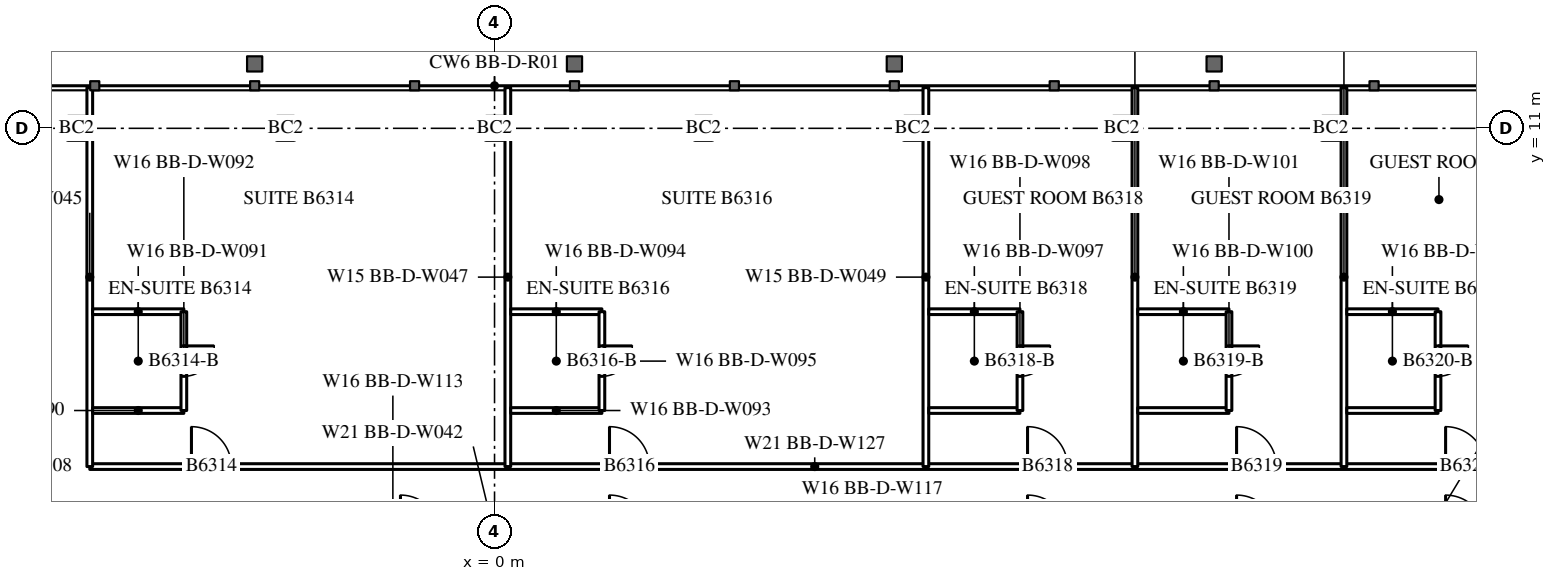
"""IFC4 building model, lengths in metres.
Left out: names, types, materials, properties, quantities, classifications, styles, units other than length and angle.
Written with IfcOpenShell. Run it as: python <this file> out.ifc"""

import sys

from ifc_helpers import new_model, si_unit, direction, frame, frame_2d, origin, origin_2d, place, context, subcontext, project, spatial, rectangle, i_section, extrude, element, fill, save


model = new_model("IFC4")
c1 = context("Model", 3, precision=1e-05, world=origin(), true_north=direction((0.0, 1.0)))
c2 = subcontext(c1, "Body", "Model", "MODEL_VIEW")
j1 = project(units=[si_unit("LENGTHUNIT", "METRE"), si_unit("PLANEANGLEUNIT", "RADIAN")], contexts=[c1])
p1 = place(None, origin())
s1 = spatial("IfcSite", under=j1, at=p1, CompositionType="ELEMENT")
p2 = place(p1, origin())
s2 = spatial("IfcBuilding", under=s1, at=p2, CompositionType="ELEMENT")
p3 = place(p2, frame((0.0, 0.0, 236.9)))
s3 = spatial("IfcBuildingStorey", under=s2, at=p3, CompositionType="ELEMENT", Elevation=236.9)
for number, where, z_axis, x_axis in (
    (1, (-11.0, 11.0, 0.0), (0.0, 0.0, 1.0), (1.0, 0.0, 0.0)),
    (2, (-5.5, 11.0, 0.0), (0.0, 0.0, 1.0), (1.0, 0.0, 0.0)),
    (3, (0.0, 11.0, 0.0), (0.0, 0.0, 1.0), (1.0, 0.0, 0.0)),
    (4, (5.5, 11.0, 0.0), (0.0, 0.0, 1.0), (1.0, 0.0, 0.0)),
    (5, (11.0, 11.0, 0.0), (0.0, 0.0, 1.0), (1.0, 0.0, 0.0)),
    (6, (16.5, 11.0, 0.0), (0.0, 0.0, 1.0), (1.0, 0.0, 0.0)),
    (7, (22.0, 11.0, 0.0), (0.0, 0.0, 1.0), (1.0, 0.0, 0.0)),
):
    element("IfcColumn", number, at=place(p3, frame(where, z_axis=z_axis, x_axis=x_axis)), inside=s3, PredefinedType="COLUMN", context=c2, shape_type="SweptSolid", body=[
        extrude(i_section(OverallWidth=0.448, OverallDepth=0.55, WebThickness=0.072, FlangeThickness=0.115, FilletRadius=0.02, at=origin_2d()), origin(), (0.0, 0.0, 1.0), 3.6),
    ])
p4 = place(p3, frame((-10.65, 2.1, 0.0), z_axis=(0.0, 0.0, 1.0), x_axis=(1.0, 0.0, 0.0)))
e8 = element("IfcWall", 8, at=p4, inside=s3, PredefinedType="PARTITIONING", context=c2, shape_type="SweptSolid", body=[
    extrude(rectangle(XDim=38.15, YDim=0.15, at=frame_2d((19.075, 0.0))), origin(), (0.0, 0.0, 1.0), 3.4),
])
p5 = place(p4, frame((2.675, 0.0, 0.0)))
e9 = element("IfcOpeningElement", 9, at=p5, cuts=e8, PredefinedType="OPENING", context=c2, shape_type="SweptSolid", body=[
    extrude(rectangle(XDim=1.05, YDim=2.4, at=frame_2d((0.525, 1.2))), frame((0.0, 0.085, 0.0), z_axis=(0.0, -1.0, 0.0), x_axis=(1.0, 0.0, 0.0)), (0.0, 0.0, 1.0), 0.17),
])
p6 = place(p4, frame((13.675, 0.0, 0.0)))
e10 = element("IfcOpeningElement", 10, at=p6, cuts=e8, PredefinedType="OPENING", context=c2, shape_type="SweptSolid", body=[
    extrude(rectangle(XDim=1.05, YDim=2.4, at=frame_2d((0.525, 1.2))), frame((0.0, 0.085, 0.0), z_axis=(0.0, -1.0, 0.0), x_axis=(1.0, 0.0, 0.0)), (0.0, 0.0, 1.0), 0.17),
])
p7 = place(p4, frame((24.675, 0.0, 0.0)))
e11 = element("IfcOpeningElement", 11, at=p7, cuts=e8, PredefinedType="OPENING", context=c2, shape_type="SweptSolid", body=[
    extrude(rectangle(XDim=1.05, YDim=2.4, at=frame_2d((0.525, 1.2))), frame((0.0, 0.085, 0.0), z_axis=(0.0, -1.0, 0.0), x_axis=(1.0, 0.0, 0.0)), (0.0, 0.0, 1.0), 0.17),
])
p8 = place(p4, frame((30.175, 0.0, 0.0)))
e12 = element("IfcOpeningElement", 12, at=p8, cuts=e8, PredefinedType="OPENING", context=c2, shape_type="SweptSolid", body=[
    extrude(rectangle(XDim=1.05, YDim=2.4, at=frame_2d((0.525, 1.2))), frame((0.0, 0.085, 0.0), z_axis=(0.0, -1.0, 0.0), x_axis=(1.0, 0.0, 0.0)), (0.0, 0.0, 1.0), 0.17),
])
p9 = place(p4, frame((35.675, 0.0, 0.0)))
e13 = element("IfcOpeningElement", 13, at=p9, cuts=e8, PredefinedType="OPENING", context=c2, shape_type="SweptSolid", body=[
    extrude(rectangle(XDim=1.05, YDim=2.4, at=frame_2d((0.525, 1.2))), frame((0.0, 0.085, 0.0), z_axis=(0.0, -1.0, 0.0), x_axis=(1.0, 0.0, 0.0)), (0.0, 0.0, 1.0), 0.17),
])
for number, where, z_axis, x_axis in (
    (14, (-10.65, 2.1, 0.0), (0.0, 0.0, 1.0), (0.0, 1.0, 0.0)),
    (15, (0.35, 2.1, 0.0), (0.0, 0.0, 1.0), (0.0, 1.0, 0.0)),
    (16, (11.35, 2.1, 0.0), (0.0, 0.0, 1.0), (0.0, 1.0, 0.0)),
    (17, (16.85, 2.1, 0.0), (0.0, 0.0, 1.0), (0.0, 1.0, 0.0)),
    (18, (22.35, 2.1, 0.0), (0.0, 0.0, 1.0), (0.0, 1.0, 0.0)),
):
    element("IfcWall", number, at=place(p3, frame(where, z_axis=z_axis, x_axis=x_axis)), inside=s3, PredefinedType="PARTITIONING", context=c2, shape_type="SweptSolid", body=[
        extrude(rectangle(XDim=9.97, YDim=0.15, at=frame_2d((4.985, 0.0))), origin(), (0.0, 0.0, 1.0), 3.4),
    ])
for number, where, z_axis, x_axis in (
    (19, (-10.575, 6.175, 0.0), (0.0, 0.0, 1.0), (1.0, 0.0, 0.0)),
    (20, (-10.575, 3.575, 0.0), (0.0, 0.0, 1.0), (1.0, 0.0, 0.0)),
):
    element("IfcWall", number, at=place(p3, frame(where, z_axis=z_axis, x_axis=x_axis)), inside=s3, PredefinedType="PARTITIONING", context=c2, shape_type="SweptSolid", body=[
        extrude(rectangle(XDim=2.4, YDim=0.15, at=frame_2d((1.2, 0.0))), origin(), (0.0, 0.0, 1.0), 3.4),
    ])
p10 = place(p3, frame((-8.175, 3.575, 0.0), z_axis=(0.0, 0.0, 1.0), x_axis=(0.0, 1.0, 0.0)))
e21 = element("IfcWall", 21, at=p10, inside=s3, PredefinedType="PARTITIONING", context=c2, shape_type="SweptSolid", body=[
    extrude(rectangle(XDim=2.6, YDim=0.15, at=frame_2d((1.3, 0.0))), origin(), (0.0, 0.0, 1.0), 3.4),
])
p11 = place(p10, frame((0.9, 0.0, 0.0)))
e22 = element("IfcOpeningElement", 22, at=p11, cuts=e21, PredefinedType="OPENING", context=c2, shape_type="SweptSolid", body=[
    extrude(rectangle(XDim=0.8, YDim=2.2, at=frame_2d((0.4, 1.1))), frame((0.0, 0.085, 0.0), z_axis=(0.0, -1.0, 0.0), x_axis=(1.0, 0.0, 0.0)), (0.0, 0.0, 1.0), 0.17),
])
for number, where, z_axis, x_axis in (
    (23, (0.425, 6.175, 0.0), (0.0, 0.0, 1.0), (1.0, 0.0, 0.0)),
    (24, (0.425, 3.575, 0.0), (0.0, 0.0, 1.0), (1.0, 0.0, 0.0)),
):
    element("IfcWall", number, at=place(p3, frame(where, z_axis=z_axis, x_axis=x_axis)), inside=s3, PredefinedType="PARTITIONING", context=c2, shape_type="SweptSolid", body=[
        extrude(rectangle(XDim=2.4, YDim=0.15, at=frame_2d((1.2, 0.0))), origin(), (0.0, 0.0, 1.0), 3.4),
    ])
p12 = place(p3, frame((2.825, 3.575, 0.0), z_axis=(0.0, 0.0, 1.0), x_axis=(0.0, 1.0, 0.0)))
e25 = element("IfcWall", 25, at=p12, inside=s3, PredefinedType="PARTITIONING", context=c2, shape_type="SweptSolid", body=[
    extrude(rectangle(XDim=2.6, YDim=0.15, at=frame_2d((1.3, 0.0))), origin(), (0.0, 0.0, 1.0), 3.4),
])
p13 = place(p12, frame((0.9, 0.0, 0.0)))
e26 = element("IfcOpeningElement", 26, at=p13, cuts=e25, PredefinedType="OPENING", context=c2, shape_type="SweptSolid", body=[
    extrude(rectangle(XDim=0.8, YDim=2.2, at=frame_2d((0.4, 1.1))), frame((0.0, 0.085, 0.0), z_axis=(0.0, -1.0, 0.0), x_axis=(1.0, 0.0, 0.0)), (0.0, 0.0, 1.0), 0.17),
])
for number, where, z_axis, x_axis in (
    (27, (11.425, 6.175, 0.0), (0.0, 0.0, 1.0), (1.0, 0.0, 0.0)),
    (28, (11.425, 3.575, 0.0), (0.0, 0.0, 1.0), (1.0, 0.0, 0.0)),
):
    element("IfcWall", number, at=place(p3, frame(where, z_axis=z_axis, x_axis=x_axis)), inside=s3, PredefinedType="PARTITIONING", context=c2, shape_type="SweptSolid", body=[
        extrude(rectangle(XDim=2.4, YDim=0.15, at=frame_2d((1.2, 0.0))), origin(), (0.0, 0.0, 1.0), 3.4),
    ])
p14 = place(p3, frame((13.825, 3.575, 0.0), z_axis=(0.0, 0.0, 1.0), x_axis=(0.0, 1.0, 0.0)))
e29 = element("IfcWall", 29, at=p14, inside=s3, PredefinedType="PARTITIONING", context=c2, shape_type="SweptSolid", body=[
    extrude(rectangle(XDim=2.6, YDim=0.15, at=frame_2d((1.3, 0.0))), origin(), (0.0, 0.0, 1.0), 3.4),
])
p15 = place(p14, frame((0.9, 0.0, 0.0)))
e30 = element("IfcOpeningElement", 30, at=p15, cuts=e29, PredefinedType="OPENING", context=c2, shape_type="SweptSolid", body=[
    extrude(rectangle(XDim=0.8, YDim=2.2, at=frame_2d((0.4, 1.1))), frame((0.0, 0.085, 0.0), z_axis=(0.0, -1.0, 0.0), x_axis=(1.0, 0.0, 0.0)), (0.0, 0.0, 1.0), 0.17),
])
for number, where, z_axis, x_axis in (
    (31, (16.925, 6.175, 0.0), (0.0, 0.0, 1.0), (1.0, 0.0, 0.0)),
    (32, (16.925, 3.575, 0.0), (0.0, 0.0, 1.0), (1.0, 0.0, 0.0)),
):
    element("IfcWall", number, at=place(p3, frame(where, z_axis=z_axis, x_axis=x_axis)), inside=s3, PredefinedType="PARTITIONING", context=c2, shape_type="SweptSolid", body=[
        extrude(rectangle(XDim=2.4, YDim=0.15, at=frame_2d((1.2, 0.0))), origin(), (0.0, 0.0, 1.0), 3.4),
    ])
p16 = place(p3, frame((19.325, 3.575, 0.0), z_axis=(0.0, 0.0, 1.0), x_axis=(0.0, 1.0, 0.0)))
e33 = element("IfcWall", 33, at=p16, inside=s3, PredefinedType="PARTITIONING", context=c2, shape_type="SweptSolid", body=[
    extrude(rectangle(XDim=2.6, YDim=0.15, at=frame_2d((1.3, 0.0))), origin(), (0.0, 0.0, 1.0), 3.4),
])
p17 = place(p16, frame((0.9, 0.0, 0.0)))
e34 = element("IfcOpeningElement", 34, at=p17, cuts=e33, PredefinedType="OPENING", context=c2, shape_type="SweptSolid", body=[
    extrude(rectangle(XDim=0.8, YDim=2.2, at=frame_2d((0.4, 1.1))), frame((0.0, 0.085, 0.0), z_axis=(0.0, -1.0, 0.0), x_axis=(1.0, 0.0, 0.0)), (0.0, 0.0, 1.0), 0.17),
])
for number, where, z_axis, x_axis in (
    (35, (22.425, 6.175, 0.0), (0.0, 0.0, 1.0), (1.0, 0.0, 0.0)),
    (36, (22.425, 3.575, 0.0), (0.0, 0.0, 1.0), (1.0, 0.0, 0.0)),
):
    element("IfcWall", number, at=place(p3, frame(where, z_axis=z_axis, x_axis=x_axis)), inside=s3, PredefinedType="PARTITIONING", context=c2, shape_type="SweptSolid", body=[
        extrude(rectangle(XDim=2.4, YDim=0.15, at=frame_2d((1.2, 0.0))), origin(), (0.0, 0.0, 1.0), 3.4),
    ])
p18 = place(p3, frame((24.825, 3.575, 0.0), z_axis=(0.0, 0.0, 1.0), x_axis=(0.0, 1.0, 0.0)))
e37 = element("IfcWall", 37, at=p18, inside=s3, PredefinedType="PARTITIONING", context=c2, shape_type="SweptSolid", body=[
    extrude(rectangle(XDim=2.6, YDim=0.15, at=frame_2d((1.3, 0.0))), origin(), (0.0, 0.0, 1.0), 3.4),
])
p19 = place(p18, frame((0.9, 0.0, 0.0)))
e38 = element("IfcOpeningElement", 38, at=p19, cuts=e37, PredefinedType="OPENING", context=c2, shape_type="SweptSolid", body=[
    extrude(rectangle(XDim=0.8, YDim=2.2, at=frame_2d((0.4, 1.1))), frame((0.0, 0.085, 0.0), z_axis=(0.0, -1.0, 0.0), x_axis=(1.0, 0.0, 0.0)), (0.0, 0.0, 1.0), 0.17),
])
p20 = place(p11, origin())
e39 = element("IfcDoor", 39, at=p20, inside=s3, OperationType="SINGLE_SWING_RIGHT", PredefinedType="DOOR", context=c2, shape_type="SweptSolid", body=[
    extrude(rectangle(XDim=0.8, YDim=2.2, at=frame_2d((0.4, 1.1))), frame((0.0, 0.025, 0.0), z_axis=(0.0, -1.0, 0.0), x_axis=(1.0, 0.0, 0.0)), (0.0, 0.0, 1.0), 0.05),
])
fill(e22, e39)
p21 = place(p5, origin())
e40 = element("IfcDoor", 40, at=p21, inside=s3, OperationType="SINGLE_SWING_LEFT", PredefinedType="DOOR", context=c2, shape_type="SweptSolid", body=[
    extrude(rectangle(XDim=1.05, YDim=2.4, at=frame_2d((0.525, 1.2))), frame((0.0, 0.025, 0.0), z_axis=(0.0, -1.0, 0.0), x_axis=(1.0, 0.0, 0.0)), (0.0, 0.0, 1.0), 0.05),
])
fill(e9, e40)
p22 = place(p13, origin())
e41 = element("IfcDoor", 41, at=p22, inside=s3, OperationType="SINGLE_SWING_RIGHT", PredefinedType="DOOR", context=c2, shape_type="SweptSolid", body=[
    extrude(rectangle(XDim=0.8, YDim=2.2, at=frame_2d((0.4, 1.1))), frame((0.0, 0.025, 0.0), z_axis=(0.0, -1.0, 0.0), x_axis=(1.0, 0.0, 0.0)), (0.0, 0.0, 1.0), 0.05),
])
fill(e26, e41)
p23 = place(p6, origin())
e42 = element("IfcDoor", 42, at=p23, inside=s3, OperationType="SINGLE_SWING_LEFT", PredefinedType="DOOR", context=c2, shape_type="SweptSolid", body=[
    extrude(rectangle(XDim=1.05, YDim=2.4, at=frame_2d((0.525, 1.2))), frame((0.0, 0.025, 0.0), z_axis=(0.0, -1.0, 0.0), x_axis=(1.0, 0.0, 0.0)), (0.0, 0.0, 1.0), 0.05),
])
fill(e10, e42)
p24 = place(p15, origin())
e43 = element("IfcDoor", 43, at=p24, inside=s3, OperationType="SINGLE_SWING_RIGHT", PredefinedType="DOOR", context=c2, shape_type="SweptSolid", body=[
    extrude(rectangle(XDim=0.8, YDim=2.2, at=frame_2d((0.4, 1.1))), frame((0.0, 0.025, 0.0), z_axis=(0.0, -1.0, 0.0), x_axis=(1.0, 0.0, 0.0)), (0.0, 0.0, 1.0), 0.05),
])
fill(e30, e43)
p25 = place(p7, origin())
e44 = element("IfcDoor", 44, at=p25, inside=s3, OperationType="SINGLE_SWING_LEFT", PredefinedType="DOOR", context=c2, shape_type="SweptSolid", body=[
    extrude(rectangle(XDim=1.05, YDim=2.4, at=frame_2d((0.525, 1.2))), frame((0.0, 0.025, 0.0), z_axis=(0.0, -1.0, 0.0), x_axis=(1.0, 0.0, 0.0)), (0.0, 0.0, 1.0), 0.05),
])
fill(e11, e44)
p26 = place(p17, origin())
e45 = element("IfcDoor", 45, at=p26, inside=s3, OperationType="SINGLE_SWING_RIGHT", PredefinedType="DOOR", context=c2, shape_type="SweptSolid", body=[
    extrude(rectangle(XDim=0.8, YDim=2.2, at=frame_2d((0.4, 1.1))), frame((0.0, 0.025, 0.0), z_axis=(0.0, -1.0, 0.0), x_axis=(1.0, 0.0, 0.0)), (0.0, 0.0, 1.0), 0.05),
])
fill(e34, e45)
p27 = place(p8, origin())
e46 = element("IfcDoor", 46, at=p27, inside=s3, OperationType="SINGLE_SWING_LEFT", PredefinedType="DOOR", context=c2, shape_type="SweptSolid", body=[
    extrude(rectangle(XDim=1.05, YDim=2.4, at=frame_2d((0.525, 1.2))), frame((0.0, 0.025, 0.0), z_axis=(0.0, -1.0, 0.0), x_axis=(1.0, 0.0, 0.0)), (0.0, 0.0, 1.0), 0.05),
])
fill(e12, e46)
p28 = place(p19, origin())
e47 = element("IfcDoor", 47, at=p28, inside=s3, OperationType="SINGLE_SWING_RIGHT", PredefinedType="DOOR", context=c2, shape_type="SweptSolid", body=[
    extrude(rectangle(XDim=0.8, YDim=2.2, at=frame_2d((0.4, 1.1))), frame((0.0, 0.025, 0.0), z_axis=(0.0, -1.0, 0.0), x_axis=(1.0, 0.0, 0.0)), (0.0, 0.0, 1.0), 0.05),
])
fill(e38, e47)
p29 = place(p9, origin())
e48 = element("IfcDoor", 48, at=p29, inside=s3, OperationType="SINGLE_SWING_LEFT", PredefinedType="DOOR", context=c2, shape_type="SweptSolid", body=[
    extrude(rectangle(XDim=1.05, YDim=2.4, at=frame_2d((0.525, 1.2))), frame((0.0, 0.025, 0.0), z_axis=(0.0, -1.0, 0.0), x_axis=(1.0, 0.0, 0.0)), (0.0, 0.0, 1.0), 0.05),
])
fill(e13, e48)
save(model, sys.argv[1])
